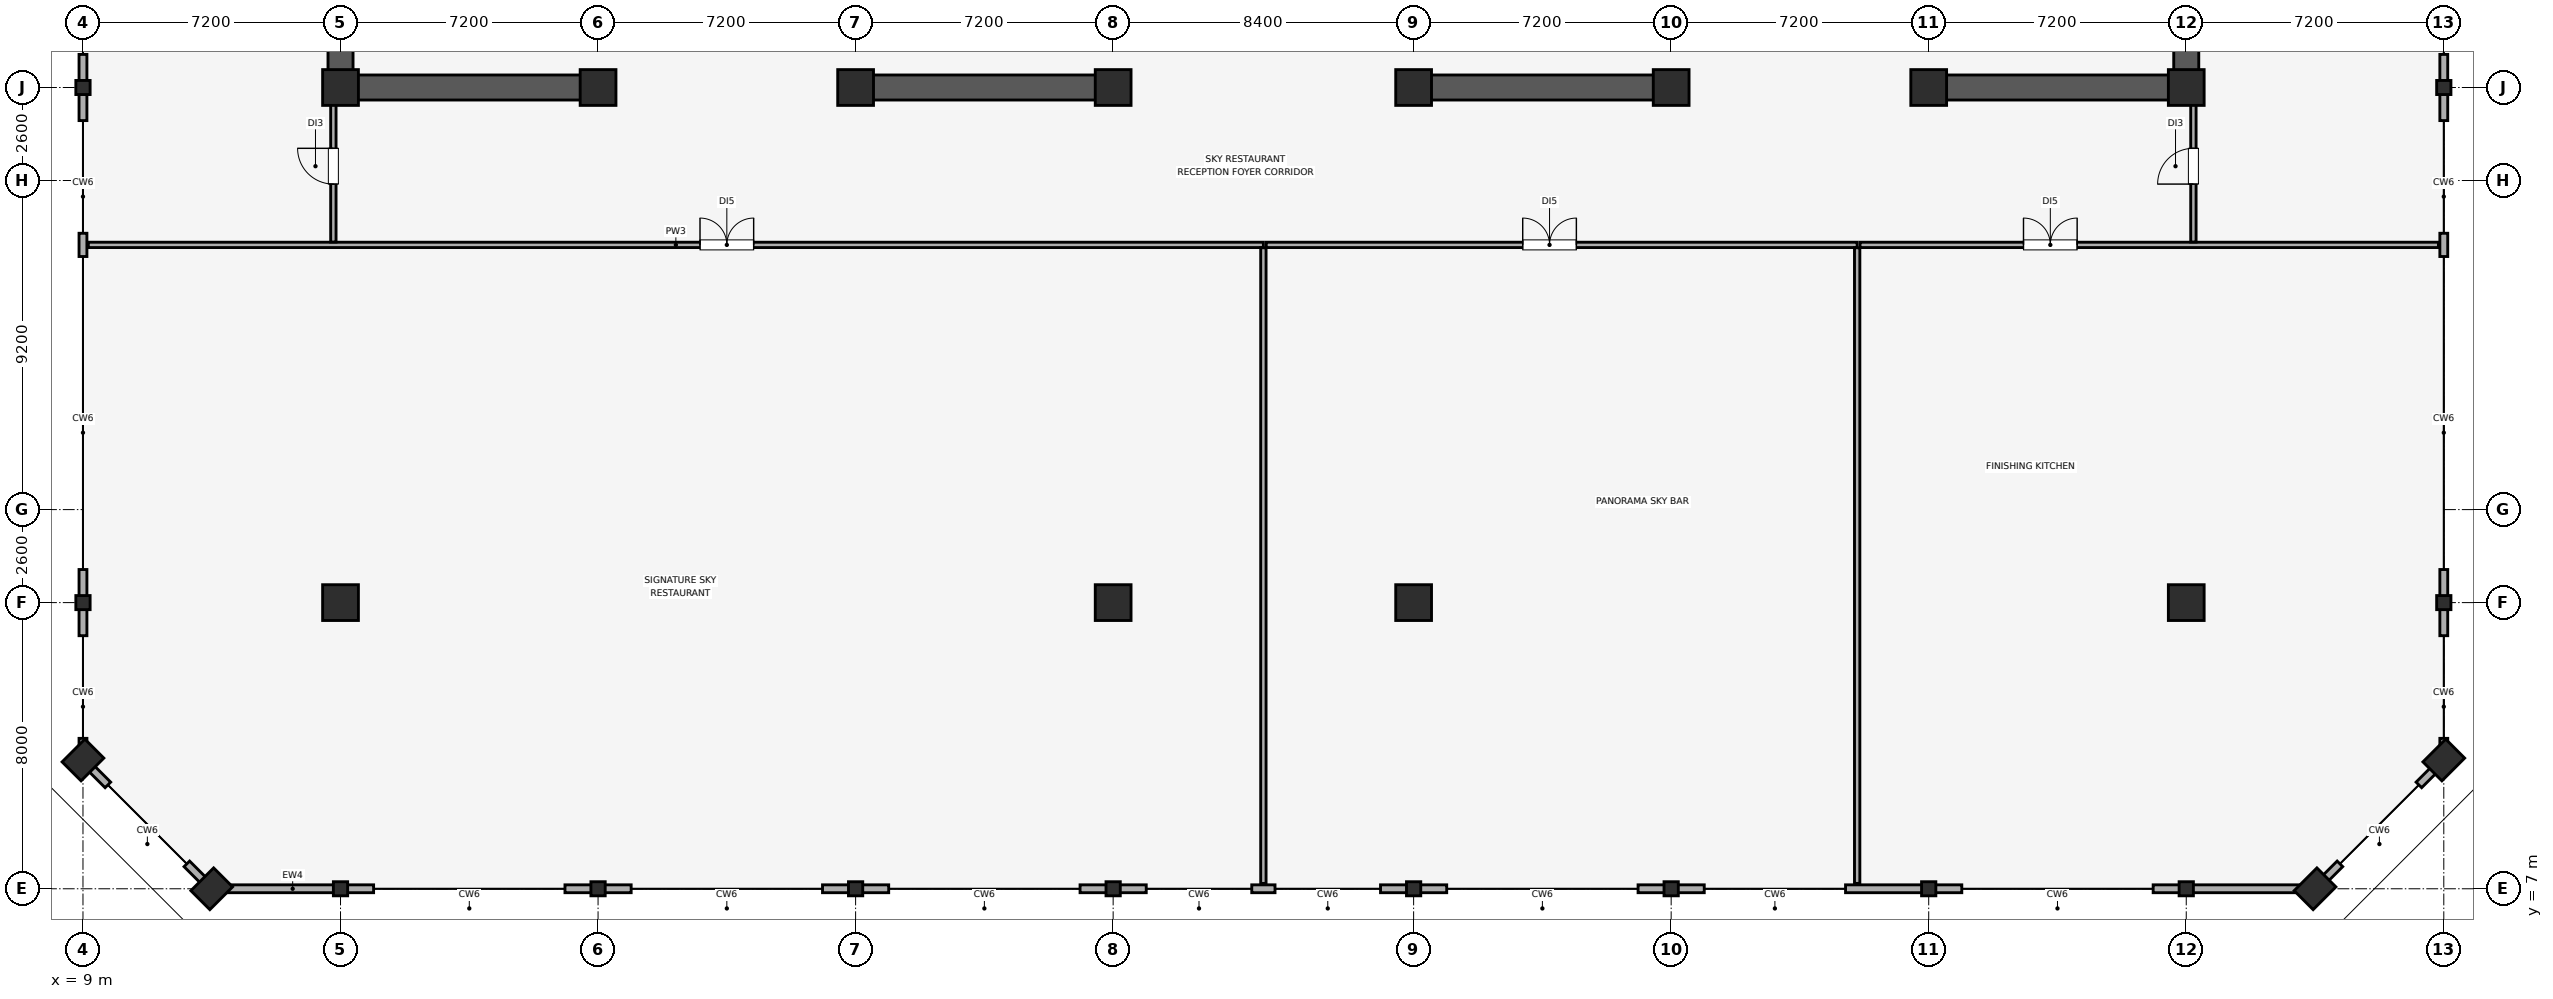
"""IFC4 building model, lengths in metres.
Left out: names, types, materials, properties, quantities, classifications, styles, units other than length and angle.
Written with IfcOpenShell. Run it as: python <this file> out.ifc"""

import sys

from ifc_helpers import new_model, si_unit, direction, frame, frame_2d, origin, origin_2d, place, context, subcontext, project, spatial, rectangle, i_section, extrude, element, fill, save


model = new_model("IFC4")
c1 = context("Model", 3, precision=1e-05, world=origin(), true_north=direction((0.0, 1.0)))
c2 = subcontext(c1, "Body", "Model", "MODEL_VIEW")
j1 = project(units=[si_unit("LENGTHUNIT", "METRE"), si_unit("PLANEANGLEUNIT", "RADIAN")], contexts=[c1])
p1 = place(None, origin())
s1 = spatial("IfcSite", under=j1, at=p1, CompositionType="ELEMENT")
p2 = place(p1, origin())
s2 = spatial("IfcBuilding", under=s1, at=p2, CompositionType="ELEMENT")
p3 = place(p2, frame((0.0, 0.0, 305.7)))
s3 = spatial("IfcBuildingStorey", under=s2, at=p3, CompositionType="ELEMENT", Elevation=305.7)
for number, where, z_axis, x_axis in (
    (1, (16.2, 7.0, 0.0), (0.0, 0.0, 1.0), (1.0, 0.0, 0.0)),
    (2, (23.4, 7.0, 0.0), (0.0, 0.0, 1.0), (1.0, 0.0, 0.0)),
    (3, (30.6, 7.0, 0.0), (0.0, 0.0, 1.0), (1.0, 0.0, 0.0)),
    (4, (37.8, 7.0, 0.0), (0.0, 0.0, 1.0), (1.0, 0.0, 0.0)),
    (5, (46.2, 7.0, 0.0), (0.0, 0.0, 1.0), (1.0, 0.0, 0.0)),
    (6, (53.4, 7.0, 0.0), (0.0, 0.0, 1.0), (1.0, 0.0, 0.0)),
    (7, (60.6, 7.0, 0.0), (0.0, 0.0, 1.0), (1.0, 0.0, 0.0)),
    (8, (67.8, 7.0, 0.0), (0.0, 0.0, 1.0), (1.0, 0.0, 0.0)),
    (9, (9.0, 15.0, 0.0), (0.0, 0.0, 1.0), (1.0, 0.0, 0.0)),
    (10, (75.0, 15.0, 0.0), (0.0, 0.0, 1.0), (1.0, 0.0, 0.0)),
    (11, (9.0, 29.4, 0.0), (0.0, 0.0, 1.0), (1.0, 0.0, 0.0)),
    (12, (75.0, 29.4, 0.0), (0.0, 0.0, 1.0), (1.0, 0.0, 0.0)),
):
    element("IfcColumn", number, at=place(p3, frame(where, z_axis=z_axis, x_axis=x_axis)), inside=s3, PredefinedType="COLUMN", context=c2, shape_type="SweptSolid", body=[
        extrude(i_section(OverallWidth=0.399, OverallDepth=0.394, WebThickness=0.023, FlangeThickness=0.037, FilletRadius=0.015, at=origin_2d()), origin(), (0.0, 0.0, 1.0), 4.7),
    ])
for number, where, z_axis, x_axis in (
    (13, (12.6, 7.0, 0.0), (0.0, 0.0, 1.0), (0.707, 0.707, 0.0)),
    (14, (71.4, 7.0, 0.0), (0.0, 0.0, 1.0), (0.707, 0.707, 0.0)),
    (15, (75.0, 10.6, 0.0), (0.0, 0.0, 1.0), (0.707, 0.707, 0.0)),
    (16, (9.0, 10.6, 0.0), (0.0, 0.0, 1.0), (0.707, 0.707, 0.0)),
):
    element("IfcColumn", number, at=place(p3, frame(where, z_axis=z_axis, x_axis=x_axis)), inside=s3, PredefinedType="PILASTER", context=c2, shape_type="SweptSolid", body=[
        extrude(rectangle(XDim=0.9, YDim=0.75, at=origin_2d()), origin(), (0.0, 0.0, 1.0), 4.7),
    ])
for number, where, z_axis, x_axis in (
    (17, (16.2, 15.0, 0.0), (0.0, 0.0, 1.0), (1.0, 0.0, 0.0)),
    (18, (37.8, 15.0, 0.0), (0.0, 0.0, 1.0), (1.0, 0.0, 0.0)),
    (19, (46.2, 15.0, 0.0), (0.0, 0.0, 1.0), (1.0, 0.0, 0.0)),
    (20, (67.8, 15.0, 0.0), (0.0, 0.0, 1.0), (1.0, 0.0, 0.0)),
    (21, (16.2, 29.4, 0.0), (0.0, 0.0, 1.0), (1.0, 0.0, 0.0)),
    (22, (23.4, 29.4, 0.0), (0.0, 0.0, 1.0), (1.0, 0.0, 0.0)),
    (23, (30.6, 29.4, 0.0), (0.0, 0.0, 1.0), (1.0, 0.0, 0.0)),
    (24, (37.8, 29.4, 0.0), (0.0, 0.0, 1.0), (1.0, 0.0, 0.0)),
    (25, (46.2, 29.4, 0.0), (0.0, 0.0, 1.0), (1.0, 0.0, 0.0)),
    (26, (53.4, 29.4, 0.0), (0.0, 0.0, 1.0), (1.0, 0.0, 0.0)),
    (27, (60.6, 29.4, 0.0), (0.0, 0.0, 1.0), (1.0, 0.0, 0.0)),
    (28, (67.8, 29.4, 0.0), (0.0, 0.0, 1.0), (1.0, 0.0, 0.0)),
):
    element("IfcColumn", number, at=place(p3, frame(where, z_axis=z_axis, x_axis=x_axis)), inside=s3, PredefinedType="COLUMN", context=c2, shape_type="SweptSolid", body=[
        extrude(rectangle(XDim=1.0, YDim=1.0, at=origin_2d()), origin(), (0.0, 0.0, 1.0), 4.7),
    ])
p4 = place(p3, frame((12.6, 7.0, 0.0), z_axis=(0.0, 0.0, 1.0), x_axis=(1.0, 0.0, 0.0)))
e29 = element("IfcWall", 29, at=p4, inside=s3, PredefinedType="SOLIDWALL", context=c2, shape_type="SweptSolid", body=[
    extrude(rectangle(XDim=4.525, YDim=0.22, at=frame_2d((2.262, 0.0))), origin(), (0.0, 0.0, 1.0), 3.9),
])
for number, where, z_axis, x_axis in (
    (30, (22.475, 7.0, 0.0), (0.0, 0.0, 1.0), (1.0, 0.0, 0.0)),
    (31, (29.675, 7.0, 0.0), (0.0, 0.0, 1.0), (1.0, 0.0, 0.0)),
):
    element("IfcWall", number, at=place(p3, frame(where, z_axis=z_axis, x_axis=x_axis)), inside=s3, PredefinedType="SOLIDWALL", context=c2, shape_type="SweptSolid", body=[
        extrude(rectangle(XDim=1.85, YDim=0.22, at=frame_2d((0.925, 0.0))), origin(), (0.0, 0.0, 1.0), 3.9),
    ])
p5 = place(p3, frame((36.875, 7.0, 0.0), z_axis=(0.0, 0.0, 1.0), x_axis=(1.0, 0.0, 0.0)))
e32 = element("IfcWall", 32, at=p5, inside=s3, PredefinedType="SOLIDWALL", context=c2, shape_type="SweptSolid", body=[
    extrude(rectangle(XDim=1.85, YDim=0.22, at=frame_2d((0.925, 0.0))), origin(), (0.0, 0.0, 1.0), 3.9),
])
p6 = place(p3, frame((41.675, 7.0, 0.0), z_axis=(0.0, 0.0, 1.0), x_axis=(1.0, 0.0, 0.0)))
e33 = element("IfcWall", 33, at=p6, inside=s3, PredefinedType="SOLIDWALL", context=c2, shape_type="SweptSolid", body=[
    extrude(rectangle(XDim=0.65, YDim=0.22, at=frame_2d((0.325, 0.0))), origin(), (0.0, 0.0, 1.0), 3.9),
])
p7 = place(p3, frame((45.275, 7.0, 0.0), z_axis=(0.0, 0.0, 1.0), x_axis=(1.0, 0.0, 0.0)))
e34 = element("IfcWall", 34, at=p7, inside=s3, PredefinedType="SOLIDWALL", context=c2, shape_type="SweptSolid", body=[
    extrude(rectangle(XDim=1.85, YDim=0.22, at=frame_2d((0.925, 0.0))), origin(), (0.0, 0.0, 1.0), 3.9),
])
p8 = place(p3, frame((52.475, 7.0, 0.0), z_axis=(0.0, 0.0, 1.0), x_axis=(1.0, 0.0, 0.0)))
e35 = element("IfcWall", 35, at=p8, inside=s3, PredefinedType="SOLIDWALL", context=c2, shape_type="SweptSolid", body=[
    extrude(rectangle(XDim=1.85, YDim=0.22, at=frame_2d((0.925, 0.0))), origin(), (0.0, 0.0, 1.0), 3.9),
])
p9 = place(p3, frame((58.275, 7.0, 0.0), z_axis=(0.0, 0.0, 1.0), x_axis=(1.0, 0.0, 0.0)))
e36 = element("IfcWall", 36, at=p9, inside=s3, PredefinedType="SOLIDWALL", context=c2, shape_type="SweptSolid", body=[
    extrude(rectangle(XDim=3.25, YDim=0.22, at=frame_2d((1.625, 0.0))), origin(), (0.0, 0.0, 1.0), 3.9),
])
p10 = place(p3, frame((66.875, 7.0, 0.0), z_axis=(0.0, 0.0, 1.0), x_axis=(1.0, 0.0, 0.0)))
e37 = element("IfcWall", 37, at=p10, inside=s3, PredefinedType="SOLIDWALL", context=c2, shape_type="SweptSolid", body=[
    extrude(rectangle(XDim=4.525, YDim=0.22, at=frame_2d((2.262, 0.0))), origin(), (0.0, 0.0, 1.0), 3.9),
])
for number, where, z_axis, x_axis in (
    (38, (71.4, 7.0, 0.0), (0.0, 0.0, 1.0), (0.707, 0.707, 0.0)),
    (39, (74.303, 9.904, 0.0), (0.0, 0.0, 1.0), (0.707, 0.707, 0.0)),
):
    element("IfcWall", number, at=place(p3, frame(where, z_axis=z_axis, x_axis=x_axis)), inside=s3, PredefinedType="SOLIDWALL", context=c2, shape_type="SweptSolid", body=[
        extrude(rectangle(XDim=0.985, YDim=0.22, at=frame_2d((0.493, 0.0))), origin(), (0.0, 0.0, 1.0), 3.9),
    ])
p11 = place(p3, frame((75.0, 10.6, 0.0), z_axis=(0.0, 0.0, 1.0), x_axis=(0.0, 1.0, 0.0)))
e40 = element("IfcWall", 40, at=p11, inside=s3, PredefinedType="SOLIDWALL", context=c2, shape_type="SweptSolid", body=[
    extrude(rectangle(XDim=0.605, YDim=0.22, at=frame_2d((0.302, 0.0))), origin(), (0.0, 0.0, 1.0), 4.7),
])
p12 = place(p3, frame((75.0, 14.075, 0.0), z_axis=(0.0, 0.0, 1.0), x_axis=(0.0, 1.0, 0.0)))
e41 = element("IfcWall", 41, at=p12, inside=s3, PredefinedType="SOLIDWALL", context=c2, shape_type="SweptSolid", body=[
    extrude(rectangle(XDim=1.85, YDim=0.22, at=frame_2d((0.925, 0.0))), origin(), (0.0, 0.0, 1.0), 3.9),
])
p13 = place(p3, frame((75.0, 24.675, 0.0), z_axis=(0.0, 0.0, 1.0), x_axis=(0.0, 1.0, 0.0)))
e42 = element("IfcWall", 42, at=p13, inside=s3, PredefinedType="SOLIDWALL", context=c2, shape_type="SweptSolid", body=[
    extrude(rectangle(XDim=0.65, YDim=0.22, at=frame_2d((0.325, 0.0))), origin(), (0.0, 0.0, 1.0), 3.9),
])
for number, where, z_axis, x_axis in (
    (43, (75.0, 28.475, 0.0), (0.0, 0.0, 1.0), (0.0, 1.0, 0.0)),
    (44, (9.0, 30.325, 0.0), (0.0, 0.0, 1.0), (0.0, -1.0, 0.0)),
):
    element("IfcWall", number, at=place(p3, frame(where, z_axis=z_axis, x_axis=x_axis)), inside=s3, PredefinedType="SOLIDWALL", context=c2, shape_type="SweptSolid", body=[
        extrude(rectangle(XDim=1.85, YDim=0.22, at=frame_2d((0.925, 0.0))), origin(), (0.0, 0.0, 1.0), 3.9),
    ])
p14 = place(p3, frame((9.0, 25.325, 0.0), z_axis=(0.0, 0.0, 1.0), x_axis=(0.0, -1.0, 0.0)))
e45 = element("IfcWall", 45, at=p14, inside=s3, PredefinedType="SOLIDWALL", context=c2, shape_type="SweptSolid", body=[
    extrude(rectangle(XDim=0.65, YDim=0.22, at=frame_2d((0.325, 0.0))), origin(), (0.0, 0.0, 1.0), 3.9),
])
p15 = place(p3, frame((9.0, 15.925, 0.0), z_axis=(0.0, 0.0, 1.0), x_axis=(0.0, -1.0, 0.0)))
e46 = element("IfcWall", 46, at=p15, inside=s3, PredefinedType="SOLIDWALL", context=c2, shape_type="SweptSolid", body=[
    extrude(rectangle(XDim=1.85, YDim=0.22, at=frame_2d((0.925, 0.0))), origin(), (0.0, 0.0, 1.0), 3.9),
])
p16 = place(p3, frame((9.0, 11.205, 0.0), z_axis=(0.0, 0.0, 1.0), x_axis=(0.0, -1.0, 0.0)))
e47 = element("IfcWall", 47, at=p16, inside=s3, PredefinedType="SOLIDWALL", context=c2, shape_type="SweptSolid", body=[
    extrude(rectangle(XDim=0.605, YDim=0.22, at=frame_2d((0.302, 0.0))), origin(), (0.0, 0.0, 1.0), 4.7),
])
for number, where, z_axis, x_axis in (
    (48, (9.0, 10.6, 0.0), (0.0, 0.0, 1.0), (0.707, -0.707, 0.0)),
    (49, (11.904, 7.697, 0.0), (0.0, 0.0, 1.0), (0.707, -0.707, 0.0)),
):
    element("IfcWall", number, at=place(p3, frame(where, z_axis=z_axis, x_axis=x_axis)), inside=s3, PredefinedType="SOLIDWALL", context=c2, shape_type="SweptSolid", body=[
        extrude(rectangle(XDim=0.985, YDim=0.22, at=frame_2d((0.493, 0.0))), origin(), (0.0, 0.0, 1.0), 3.9),
    ])
for number, where, z_axis, x_axis in (
    (50, (16.2, 29.4, 0.0), (0.0, 0.0, 1.0), (0.0, 1.0, 0.0)),
    (51, (67.8, 29.4, 0.0), (0.0, 0.0, 1.0), (0.0, 1.0, 0.0)),
):
    element("IfcWall", number, at=place(p3, frame(where, z_axis=z_axis, x_axis=x_axis)), inside=s3, PredefinedType="SHEAR", context=c2, shape_type="SweptSolid", body=[
        extrude(rectangle(XDim=19.2, YDim=0.7, at=frame_2d((9.6, 0.0))), origin(), (0.0, 0.0, 1.0), 4.7),
    ])
p17 = place(p3, frame((16.555, 29.4, 0.0), z_axis=(0.0, 0.0, 1.0), x_axis=(1.0, 0.0, 0.0)))
e52 = element("IfcWall", 52, at=p17, inside=s3, PredefinedType="SHEAR", context=c2, shape_type="SweptSolid", body=[
    extrude(rectangle(XDim=7.045, YDim=0.7, at=frame_2d((3.522, 0.0))), origin(), (0.0, 0.0, 1.0), 4.7),
])
for number, where, z_axis, x_axis in (
    (53, (30.4, 29.4, 0.0), (0.0, 0.0, 1.0), (1.0, 0.0, 0.0)),
    (54, (46.0, 29.4, 0.0), (0.0, 0.0, 1.0), (1.0, 0.0, 0.0)),
):
    element("IfcWall", number, at=place(p3, frame(where, z_axis=z_axis, x_axis=x_axis)), inside=s3, PredefinedType="SHEAR", context=c2, shape_type="SweptSolid", body=[
        extrude(rectangle(XDim=7.6, YDim=0.7, at=frame_2d((3.8, 0.0))), origin(), (0.0, 0.0, 1.0), 4.7),
    ])
p18 = place(p3, frame((60.4, 29.4, 0.0), z_axis=(0.0, 0.0, 1.0), x_axis=(1.0, 0.0, 0.0)))
e55 = element("IfcWall", 55, at=p18, inside=s3, PredefinedType="SHEAR", context=c2, shape_type="SweptSolid", body=[
    extrude(rectangle(XDim=7.045, YDim=0.7, at=frame_2d((3.522, 0.0))), origin(), (0.0, 0.0, 1.0), 4.7),
])
p19 = place(p3, frame((9.15, 25.0, 0.0), z_axis=(0.0, 0.0, 1.0), x_axis=(1.0, 0.0, 0.0)))
e56 = element("IfcWall", 56, at=p19, inside=s3, PredefinedType="PARTITIONING", context=c2, shape_type="SweptSolid", body=[
    extrude(rectangle(XDim=32.85, YDim=0.15, at=frame_2d((16.425, 0.0))), origin(), (0.0, 0.0, 1.0), 4.7),
])
p20 = place(p19, frame((17.1, 0.0, 0.0)))
e57 = element("IfcOpeningElement", 57, at=p20, cuts=e56, PredefinedType="OPENING", context=c2, shape_type="SweptSolid", body=[
    extrude(rectangle(XDim=1.5, YDim=2.25, at=frame_2d((0.75, 1.125))), frame((0.0, 0.085, 0.0), z_axis=(0.0, -1.0, 0.0), x_axis=(1.0, 0.0, 0.0)), (0.0, 0.0, 1.0), 0.17),
])
p21 = place(p3, frame((42.0, 7.15, 0.0), z_axis=(0.0, 0.0, 1.0), x_axis=(0.0, 1.0, 0.0)))
e58 = element("IfcWall", 58, at=p21, inside=s3, PredefinedType="PARTITIONING", context=c2, shape_type="SweptSolid", body=[
    extrude(rectangle(XDim=17.77, YDim=0.15, at=frame_2d((8.885, 0.0))), origin(), (0.0, 0.0, 1.0), 4.3),
])
p22 = place(p3, frame((42.08, 25.0, 0.0), z_axis=(0.0, 0.0, 1.0), x_axis=(1.0, 0.0, 0.0)))
e59 = element("IfcWall", 59, at=p22, inside=s3, PredefinedType="PARTITIONING", context=c2, shape_type="SweptSolid", body=[
    extrude(rectangle(XDim=16.52, YDim=0.15, at=frame_2d((8.26, 0.0))), origin(), (0.0, 0.0, 1.0), 4.7),
])
p23 = place(p22, frame((7.17, 0.0, 0.0)))
e60 = element("IfcOpeningElement", 60, at=p23, cuts=e59, PredefinedType="OPENING", context=c2, shape_type="SweptSolid", body=[
    extrude(rectangle(XDim=1.5, YDim=2.25, at=frame_2d((0.75, 1.125))), frame((0.0, 0.085, 0.0), z_axis=(0.0, -1.0, 0.0), x_axis=(1.0, 0.0, 0.0)), (0.0, 0.0, 1.0), 0.17),
])
p24 = place(p3, frame((58.6, 7.15, 0.0), z_axis=(0.0, 0.0, 1.0), x_axis=(0.0, 1.0, 0.0)))
e61 = element("IfcWall", 61, at=p24, inside=s3, PredefinedType="PARTITIONING", context=c2, shape_type="SweptSolid", body=[
    extrude(rectangle(XDim=17.77, YDim=0.15, at=frame_2d((8.885, 0.0))), origin(), (0.0, 0.0, 1.0), 4.7),
])
p25 = place(p3, frame((58.68, 25.0, 0.0), z_axis=(0.0, 0.0, 1.0), x_axis=(1.0, 0.0, 0.0)))
e62 = element("IfcWall", 62, at=p25, inside=s3, PredefinedType="PARTITIONING", context=c2, shape_type="SweptSolid", body=[
    extrude(rectangle(XDim=16.17, YDim=0.15, at=frame_2d((8.085, 0.0))), origin(), (0.0, 0.0, 1.0), 4.7),
])
p26 = place(p25, frame((4.57, 0.0, 0.0)))
e63 = element("IfcOpeningElement", 63, at=p26, cuts=e62, PredefinedType="OPENING", context=c2, shape_type="SweptSolid", body=[
    extrude(rectangle(XDim=1.5, YDim=2.25, at=frame_2d((0.75, 1.125))), frame((0.0, 0.085, 0.0), z_axis=(0.0, -1.0, 0.0), x_axis=(1.0, 0.0, 0.0)), (0.0, 0.0, 1.0), 0.17),
])
p27 = place(p3, frame((16.0, 25.08, 0.0), z_axis=(0.0, 0.0, 1.0), x_axis=(0.0, 1.0, 0.0)))
e64 = element("IfcWall", 64, at=p27, inside=s3, PredefinedType="PARTITIONING", context=c2, shape_type="SweptSolid", body=[
    extrude(rectangle(XDim=4.31, YDim=0.15, at=frame_2d((2.155, 0.0))), origin(), (0.0, 0.0, 1.0), 4.7),
])
p28 = place(p27, frame((1.62, 0.0, 0.0)))
e65 = element("IfcOpeningElement", 65, at=p28, cuts=e64, PredefinedType="OPENING", context=c2, shape_type="SweptSolid", body=[
    extrude(rectangle(XDim=1.0, YDim=2.15, at=frame_2d((0.5, 1.075))), frame((0.0, 0.085, 0.0), z_axis=(0.0, -1.0, 0.0), x_axis=(1.0, 0.0, 0.0)), (0.0, 0.0, 1.0), 0.17),
])
p29 = place(p3, frame((68.0, 25.08, 0.0), z_axis=(0.0, 0.0, 1.0), x_axis=(0.0, 1.0, 0.0)))
e66 = element("IfcWall", 66, at=p29, inside=s3, PredefinedType="PARTITIONING", context=c2, shape_type="SweptSolid", body=[
    extrude(rectangle(XDim=4.31, YDim=0.15, at=frame_2d((2.155, 0.0))), origin(), (0.0, 0.0, 1.0), 4.7),
])
p30 = place(p29, frame((1.62, 0.0, 0.0)))
e67 = element("IfcOpeningElement", 67, at=p30, cuts=e66, PredefinedType="OPENING", context=c2, shape_type="SweptSolid", body=[
    extrude(rectangle(XDim=1.0, YDim=2.15, at=frame_2d((0.5, 1.075))), frame((0.0, 0.085, 0.0), z_axis=(0.0, -1.0, 0.0), x_axis=(1.0, 0.0, 0.0)), (0.0, 0.0, 1.0), 0.17),
])
p31 = place(p20, origin())
e68 = element("IfcDoor", 68, at=p31, inside=s3, OperationType="DOUBLE_DOOR_SINGLE_SWING", PredefinedType="DOOR", context=c2, shape_type="SweptSolid", body=[
    extrude(rectangle(XDim=1.5, YDim=2.25, at=frame_2d((0.75, 1.125))), frame((0.0, 0.025, 0.0), z_axis=(0.0, -1.0, 0.0), x_axis=(1.0, 0.0, 0.0)), (0.0, 0.0, 1.0), 0.05),
])
fill(e57, e68)
p32 = place(p23, origin())
e69 = element("IfcDoor", 69, at=p32, inside=s3, OperationType="DOUBLE_DOOR_SINGLE_SWING", PredefinedType="DOOR", context=c2, shape_type="SweptSolid", body=[
    extrude(rectangle(XDim=1.5, YDim=2.25, at=frame_2d((0.75, 1.125))), frame((0.0, 0.025, 0.0), z_axis=(0.0, -1.0, 0.0), x_axis=(1.0, 0.0, 0.0)), (0.0, 0.0, 1.0), 0.05),
])
fill(e60, e69)
p33 = place(p26, origin())
e70 = element("IfcDoor", 70, at=p33, inside=s3, OperationType="DOUBLE_DOOR_SINGLE_SWING", PredefinedType="DOOR", context=c2, shape_type="SweptSolid", body=[
    extrude(rectangle(XDim=1.5, YDim=2.25, at=frame_2d((0.75, 1.125))), frame((0.0, 0.025, 0.0), z_axis=(0.0, -1.0, 0.0), x_axis=(1.0, 0.0, 0.0)), (0.0, 0.0, 1.0), 0.05),
])
fill(e63, e70)
p34 = place(p28, origin())
e71 = element("IfcDoor", 71, at=p34, inside=s3, OperationType="SINGLE_SWING_RIGHT", PredefinedType="DOOR", context=c2, shape_type="SweptSolid", body=[
    extrude(rectangle(XDim=1.0, YDim=2.15, at=frame_2d((0.5, 1.075))), frame((0.0, 0.025, 0.0), z_axis=(0.0, -1.0, 0.0), x_axis=(1.0, 0.0, 0.0)), (0.0, 0.0, 1.0), 0.05),
])
fill(e65, e71)
p35 = place(p30, origin())
e72 = element("IfcDoor", 72, at=p35, inside=s3, OperationType="SINGLE_SWING_LEFT", PredefinedType="DOOR", context=c2, shape_type="SweptSolid", body=[
    extrude(rectangle(XDim=1.0, YDim=2.15, at=frame_2d((0.5, 1.075))), frame((0.0, 0.025, 0.0), z_axis=(0.0, -1.0, 0.0), x_axis=(1.0, 0.0, 0.0)), (0.0, 0.0, 1.0), 0.05),
])
fill(e67, e72)
save(model, sys.argv[1])
